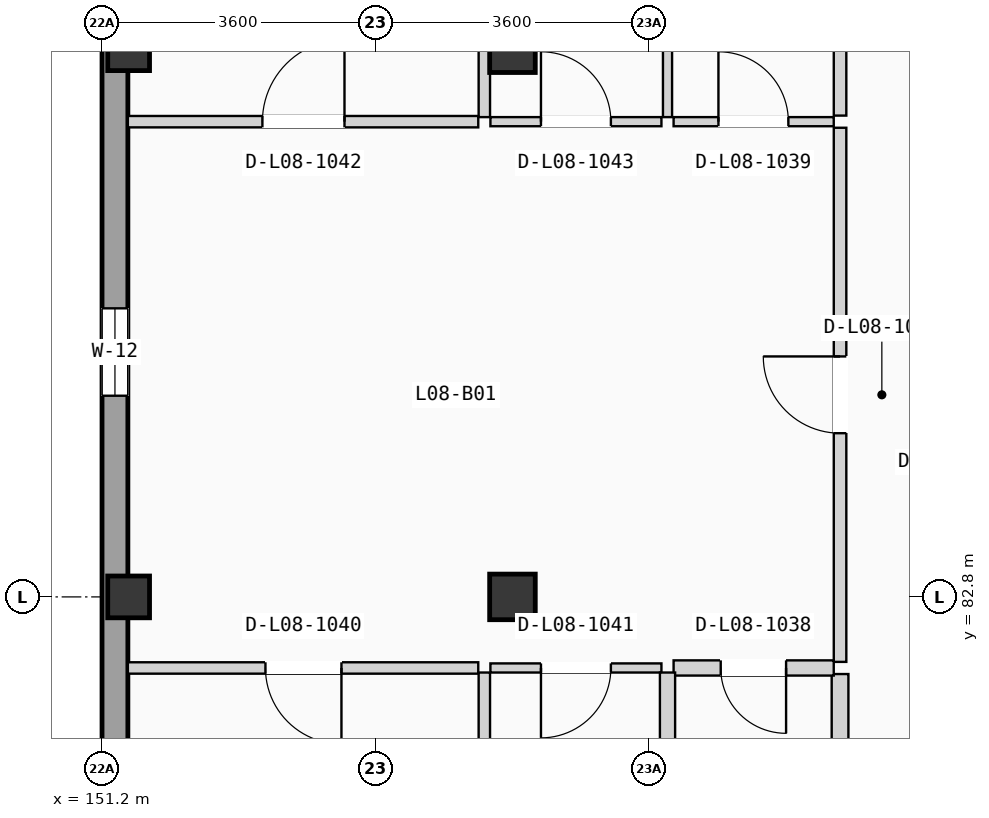
"""IFC4 building model, lengths in metres.
Left out: names, types, materials, properties, quantities, classifications, styles, units other than length and angle.
Written with IfcOpenShell. Run it as: python <this file> out.ifc"""

import sys

from ifc_helpers import new_model, si_unit, direction, frame, frame_2d, origin, origin_2d, place, context, subcontext, project, spatial, rectangle, extrude, element, fill, save


model = new_model("IFC4")
c1 = context("Model", 3, precision=1e-05, world=origin(), true_north=direction((0.0, 1.0)))
c2 = subcontext(c1, "Body", "Model", "MODEL_VIEW")
j1 = project(units=[si_unit("LENGTHUNIT", "METRE"), si_unit("PLANEANGLEUNIT", "RADIAN")], contexts=[c1])
p1 = place(None, origin())
s1 = spatial("IfcSite", under=j1, at=p1, CompositionType="ELEMENT")
p2 = place(p1, origin())
s2 = spatial("IfcBuilding", under=s1, at=p2, CompositionType="ELEMENT")
p3 = place(p2, frame((0.0, 0.0, 27.825)))
s3 = spatial("IfcBuildingStorey", under=s2, at=p3, CompositionType="ELEMENT", Elevation=27.825)
for number, where, z_axis, x_axis in (
    (1, (151.55, 82.8, 0.0), (0.0, 0.0, 1.0), (1.0, 0.0, 0.0)),
    (2, (151.55, 90.0, 0.0), (0.0, 0.0, 1.0), (1.0, 0.0, 0.0)),
):
    element("IfcColumn", number, at=place(p3, frame(where, z_axis=z_axis, x_axis=x_axis)), inside=s3, PredefinedType="COLUMN", context=c2, shape_type="SweptSolid", body=[
        extrude(rectangle(XDim=0.55, YDim=0.55, at=origin_2d()), origin(), (0.0, 0.0, 1.0), 3.15),
    ])
for number, where, z_axis, x_axis in (
    (3, (156.6, 82.8, 0.0), (0.0, 0.0, 1.0), (1.0, 0.0, 0.0)),
    (4, (156.6, 90.0, 0.0), (0.0, 0.0, 1.0), (1.0, 0.0, 0.0)),
):
    element("IfcColumn", number, at=place(p3, frame(where, z_axis=z_axis, x_axis=x_axis)), inside=s3, PredefinedType="COLUMN", context=c2, shape_type="SweptSolid", body=[
        extrude(rectangle(XDim=0.6, YDim=0.6, at=origin_2d()), origin(), (0.0, 0.0, 1.0), 3.15),
    ])
p4 = place(p3, frame((151.37, 68.74, 0.0), z_axis=(0.0, 0.0, 1.0), x_axis=(0.0, 1.0, 0.0)))
e5 = element("IfcWall", 5, at=p4, inside=s3, PredefinedType="SOLIDWALL", context=c2, shape_type="SweptSolid", body=[
    extrude(rectangle(XDim=49.72, YDim=0.34, at=frame_2d((24.86, 0.0))), origin(), (0.0, 0.0, 1.0), 2.89),
])
p5 = place(p4, frame((16.707, 0.0, 0.855)))
e6 = element("IfcOpeningElement", 6, at=p5, cuts=e5, PredefinedType="OPENING", context=c2, shape_type="SweptSolid", body=[
    extrude(rectangle(XDim=1.15, YDim=1.35, at=frame_2d((0.575, 0.675))), frame((0.0, 0.18, 0.0), z_axis=(0.0, -1.0, 0.0), x_axis=(1.0, 0.0, 0.0)), (0.0, 0.0, 1.0), 0.36),
])
p6 = place(p4, frame((9.578, 0.0, 0.705)))
e7 = element("IfcOpeningElement", 7, at=p6, cuts=e5, PredefinedType="OPENING", context=c2, shape_type="SweptSolid", body=[
    extrude(rectangle(XDim=1.15, YDim=1.5, at=frame_2d((0.575, 0.75))), frame((0.0, 0.18, 0.0), z_axis=(0.0, -1.0, 0.0), x_axis=(1.0, 0.0, 0.0)), (0.0, 0.0, 1.0), 0.36),
])
p7 = place(p4, frame((23.279, 0.0, 0.555)))
e8 = element("IfcOpeningElement", 8, at=p7, cuts=e5, PredefinedType="OPENING", context=c2, shape_type="SweptSolid", body=[
    extrude(rectangle(XDim=1.15, YDim=1.65, at=frame_2d((0.575, 0.825))), frame((0.0, 0.18, 0.0), z_axis=(0.0, -1.0, 0.0), x_axis=(1.0, 0.0, 0.0)), (0.0, 0.0, 1.0), 0.36),
])
p8 = place(p4, frame((32.935, 0.0, 0.85)))
e9 = element("IfcOpeningElement", 9, at=p8, cuts=e5, PredefinedType="OPENING", context=c2, shape_type="SweptSolid", body=[
    extrude(rectangle(XDim=0.95, YDim=1.2, at=frame_2d((0.475, 0.6))), frame((0.0, 0.18, 0.0), z_axis=(0.0, -1.0, 0.0), x_axis=(1.0, 0.0, 0.0)), (0.0, 0.0, 1.0), 0.36),
])
p9 = place(p4, frame((29.375, 0.0, 0.9)))
e10 = element("IfcOpeningElement", 10, at=p9, cuts=e5, PredefinedType="OPENING", context=c2, shape_type="SweptSolid", body=[
    extrude(rectangle(XDim=1.25, YDim=1.2, at=frame_2d((0.625, 0.6))), frame((0.0, 0.18, 0.0), z_axis=(0.0, -1.0, 0.0), x_axis=(1.0, 0.0, 0.0)), (0.0, 0.0, 1.0), 0.36),
])
p10 = place(p4, frame((39.379, 0.0, 0.855)))
e11 = element("IfcOpeningElement", 11, at=p10, cuts=e5, PredefinedType="OPENING", context=c2, shape_type="SweptSolid", body=[
    extrude(rectangle(XDim=1.25, YDim=1.35, at=frame_2d((0.625, 0.675))), frame((0.0, 0.18, 0.0), z_axis=(0.0, -1.0, 0.0), x_axis=(1.0, 0.0, 0.0)), (0.0, 0.0, 1.0), 0.36),
])
p11 = place(p3, frame((160.91, 81.945, 0.0), z_axis=(0.0, 0.0, 1.0), x_axis=(0.0, 1.0, 0.0)))
e12 = element("IfcWall", 12, at=p11, inside=s3, PredefinedType="PARTITIONING", context=c2, shape_type="SweptSolid", body=[
    extrude(rectangle(XDim=7.028, YDim=0.165, at=frame_2d((3.514, 0.0))), origin(), (0.0, 0.0, 1.0), 2.87),
])
p12 = place(p11, frame((3.009, 0.0, 0.0)))
e13 = element("IfcOpeningElement", 13, at=p12, cuts=e12, PredefinedType="OPENING", context=c2, shape_type="SweptSolid", body=[
    extrude(rectangle(XDim=1.01, YDim=2.11, at=frame_2d((0.505, 1.055))), frame((0.0, 0.093, 0.0), z_axis=(0.0, -1.0, 0.0), x_axis=(1.0, 0.0, 0.0)), (0.0, 0.0, 1.0), 0.185),
])
p13 = place(p3, frame((160.91, 76.0, 0.0), z_axis=(0.0, 0.0, 1.0), x_axis=(0.0, 1.0, 0.0)))
e14 = element("IfcWall", 14, at=p13, inside=s3, PredefinedType="PLUMBINGWALL", context=c2, shape_type="SweptSolid", body=[
    extrude(rectangle(XDim=5.785, YDim=0.22, at=frame_2d((2.893, 0.0))), origin(), (0.0, 0.0, 1.0), 2.87),
])
p14 = place(p3, frame((160.91, 89.133, 0.0), z_axis=(0.0, 0.0, 1.0), x_axis=(0.0, 1.0, 0.0)))
e15 = element("IfcWall", 15, at=p14, inside=s3, PredefinedType="PARTITIONING", context=c2, shape_type="SweptSolid", body=[
    extrude(rectangle(XDim=5.785, YDim=0.165, at=frame_2d((2.893, 0.0))), origin(), (0.0, 0.0, 1.0), 2.87),
])
p15 = place(p3, frame((158.72, 81.865, 0.0), z_axis=(0.0, 0.0, 1.0), x_axis=(1.0, 0.0, 0.0)))
e16 = element("IfcWall", 16, at=p15, inside=s3, PredefinedType="PLUMBINGWALL", context=c2, shape_type="SweptSolid", body=[
    extrude(rectangle(XDim=2.107, YDim=0.2, at=frame_2d((1.053, 0.0))), origin(), (0.0, 0.0, 1.0), 2.87),
])
p16 = place(p15, frame((0.62, 0.0, 0.0)))
e17 = element("IfcOpeningElement", 17, at=p16, cuts=e16, PredefinedType="OPENING", context=c2, shape_type="SweptSolid", body=[
    extrude(rectangle(XDim=0.86, YDim=2.0, at=frame_2d((0.43, 1.0))), frame((0.0, 0.11, 0.0), z_axis=(0.0, -1.0, 0.0), x_axis=(1.0, 0.0, 0.0)), (0.0, 0.0, 1.0), 0.22),
])
p17 = place(p3, frame((158.72, 89.053, 0.0), z_axis=(0.0, 0.0, 1.0), x_axis=(1.0, 0.0, 0.0)))
e18 = element("IfcWall", 18, at=p17, inside=s3, PredefinedType="PARTITIONING", context=c2, shape_type="SweptSolid", body=[
    extrude(rectangle(XDim=2.107, YDim=0.12, at=frame_2d((1.053, 0.0))), origin(), (0.0, 0.0, 1.0), 2.87),
])
p18 = place(p17, frame((0.59, 0.0, 0.0)))
e19 = element("IfcOpeningElement", 19, at=p18, cuts=e18, PredefinedType="OPENING", context=c2, shape_type="SweptSolid", body=[
    extrude(rectangle(XDim=0.92, YDim=2.02, at=frame_2d((0.46, 1.01))), frame((0.0, 0.07, 0.0), z_axis=(0.0, -1.0, 0.0), x_axis=(1.0, 0.0, 0.0)), (0.0, 0.0, 1.0), 0.14),
])
p19 = place(p3, frame((151.54, 81.865, 0.0), z_axis=(0.0, 0.0, 1.0), x_axis=(1.0, 0.0, 0.0)))
e20 = element("IfcWall", 20, at=p19, inside=s3, PredefinedType="PARTITIONING", context=c2, shape_type="SweptSolid", body=[
    extrude(rectangle(XDim=4.61, YDim=0.15, at=frame_2d((2.305, 0.0))), origin(), (0.0, 0.0, 1.0), 2.87),
])
p20 = place(p19, frame((1.81, 0.0, 0.0)))
e21 = element("IfcOpeningElement", 21, at=p20, cuts=e20, PredefinedType="OPENING", context=c2, shape_type="SweptSolid", body=[
    extrude(rectangle(XDim=1.0, YDim=2.06, at=frame_2d((0.5, 1.03))), frame((0.0, 0.085, 0.0), z_axis=(0.0, -1.0, 0.0), x_axis=(1.0, 0.0, 0.0)), (0.0, 0.0, 1.0), 0.17),
])
p21 = place(p3, frame((156.31, 81.865, 0.0), z_axis=(0.0, 0.0, 1.0), x_axis=(1.0, 0.0, 0.0)))
e22 = element("IfcWall", 22, at=p21, inside=s3, PredefinedType="PARTITIONING", context=c2, shape_type="SweptSolid", body=[
    extrude(rectangle(XDim=2.25, YDim=0.12, at=frame_2d((1.125, 0.0))), origin(), (0.0, 0.0, 1.0), 2.87),
])
p22 = place(p21, frame((0.665, 0.0, 0.0)))
e23 = element("IfcOpeningElement", 23, at=p22, cuts=e22, PredefinedType="OPENING", context=c2, shape_type="SweptSolid", body=[
    extrude(rectangle(XDim=0.92, YDim=2.02, at=frame_2d((0.46, 1.01))), frame((0.0, 0.07, 0.0), z_axis=(0.0, -1.0, 0.0), x_axis=(1.0, 0.0, 0.0)), (0.0, 0.0, 1.0), 0.14),
])
p23 = place(p3, frame((151.54, 89.053, 0.0), z_axis=(0.0, 0.0, 1.0), x_axis=(1.0, 0.0, 0.0)))
e24 = element("IfcWall", 24, at=p23, inside=s3, PredefinedType="PARTITIONING", context=c2, shape_type="SweptSolid", body=[
    extrude(rectangle(XDim=4.61, YDim=0.15, at=frame_2d((2.305, 0.0))), origin(), (0.0, 0.0, 1.0), 2.87),
])
p24 = place(p23, frame((1.77, 0.0, 0.0)))
e25 = element("IfcOpeningElement", 25, at=p24, cuts=e24, PredefinedType="OPENING", context=c2, shape_type="SweptSolid", body=[
    extrude(rectangle(XDim=1.08, YDim=2.1, at=frame_2d((0.54, 1.05))), frame((0.0, 0.085, 0.0), z_axis=(0.0, -1.0, 0.0), x_axis=(1.0, 0.0, 0.0)), (0.0, 0.0, 1.0), 0.17),
])
p25 = place(p3, frame((156.31, 89.053, 0.0), z_axis=(0.0, 0.0, 1.0), x_axis=(1.0, 0.0, 0.0)))
e26 = element("IfcWall", 26, at=p25, inside=s3, PredefinedType="PARTITIONING", context=c2, shape_type="SweptSolid", body=[
    extrude(rectangle(XDim=2.25, YDim=0.12, at=frame_2d((1.125, 0.0))), origin(), (0.0, 0.0, 1.0), 2.87),
])
p26 = place(p25, frame((0.665, 0.0, 0.0)))
e27 = element("IfcOpeningElement", 27, at=p26, cuts=e26, PredefinedType="OPENING", context=c2, shape_type="SweptSolid", body=[
    extrude(rectangle(XDim=0.92, YDim=2.02, at=frame_2d((0.46, 1.01))), frame((0.0, 0.07, 0.0), z_axis=(0.0, -1.0, 0.0), x_axis=(1.0, 0.0, 0.0)), (0.0, 0.0, 1.0), 0.14),
])
p27 = place(p3, frame((158.64, 76.0, 0.0), z_axis=(0.0, 0.0, 1.0), x_axis=(0.0, 1.0, 0.0)))
e28 = element("IfcWall", 28, at=p27, inside=s3, PredefinedType="PLUMBINGWALL", context=c2, shape_type="SweptSolid", body=[
    extrude(rectangle(XDim=5.805, YDim=0.2, at=frame_2d((2.902, 0.0))), origin(), (0.0, 0.0, 1.0), 2.87),
])
p28 = place(p27, frame((2.467, 0.0, 0.0)))
e29 = element("IfcOpeningElement", 29, at=p28, cuts=e28, PredefinedType="OPENING", context=c2, shape_type="SweptSolid", body=[
    extrude(rectangle(XDim=0.85, YDim=2.01, at=frame_2d((0.425, 1.005))), frame((0.0, 0.11, 0.0), z_axis=(0.0, -1.0, 0.0), x_axis=(1.0, 0.0, 0.0)), (0.0, 0.0, 1.0), 0.22),
])
p29 = place(p3, frame((158.64, 89.113, 0.0), z_axis=(0.0, 0.0, 1.0), x_axis=(0.0, 1.0, 0.0)))
e30 = element("IfcWall", 30, at=p29, inside=s3, PredefinedType="PARTITIONING", context=c2, shape_type="SweptSolid", body=[
    extrude(rectangle(XDim=5.805, YDim=0.12, at=frame_2d((2.902, 0.0))), origin(), (0.0, 0.0, 1.0), 2.87),
])
for number, where, z_axis, x_axis in (
    (31, (156.23, 76.0, 0.0), (0.0, 0.0, 1.0), (0.0, 1.0, 0.0)),
    (32, (156.23, 89.113, 0.0), (0.0, 0.0, 1.0), (0.0, 1.0, 0.0)),
):
    element("IfcWall", number, at=place(p3, frame(where, z_axis=z_axis, x_axis=x_axis)), inside=s3, PredefinedType="PARTITIONING", context=c2, shape_type="SweptSolid", body=[
        extrude(rectangle(XDim=5.805, YDim=0.15, at=frame_2d((2.902, 0.0))), origin(), (0.0, 0.0, 1.0), 2.87),
    ])
p30 = place(p5, origin())
e33 = element("IfcWindow", 33, at=p30, inside=s3, PartitioningType="SINGLE_PANEL", PredefinedType="WINDOW", context=c2, shape_type="SweptSolid", body=[
    extrude(rectangle(XDim=1.15, YDim=1.35, at=frame_2d((0.575, 0.675))), frame((0.0, 0.03, 0.0), z_axis=(0.0, -1.0, 0.0), x_axis=(1.0, 0.0, 0.0)), (0.0, 0.0, 1.0), 0.06),
])
fill(e6, e33)
p31 = place(p12, origin())
e34 = element("IfcDoor", 34, at=p31, inside=s3, OperationType="SINGLE_SWING_RIGHT", PredefinedType="DOOR", context=c2, shape_type="SweptSolid", body=[
    extrude(rectangle(XDim=1.01, YDim=2.11, at=frame_2d((0.505, 1.055))), frame((0.0, 0.025, 0.0), z_axis=(0.0, -1.0, 0.0), x_axis=(1.0, 0.0, 0.0)), (0.0, 0.0, 1.0), 0.05),
])
fill(e13, e34)
p32 = place(p16, frame((0.86, 0.0, 0.0), z_axis=(0.0, 0.0, 1.0), x_axis=(-1.0, 0.0, 0.0)))
e35 = element("IfcDoor", 35, at=p32, inside=s3, OperationType="SINGLE_SWING_RIGHT", PredefinedType="DOOR", context=c2, shape_type="SweptSolid", body=[
    extrude(rectangle(XDim=0.86, YDim=2.0, at=frame_2d((0.43, 1.0))), frame((0.0, 0.025, 0.0), z_axis=(0.0, -1.0, 0.0), x_axis=(1.0, 0.0, 0.0)), (0.0, 0.0, 1.0), 0.05),
])
fill(e17, e35)
p33 = place(p18, origin())
e36 = element("IfcDoor", 36, at=p33, inside=s3, OperationType="SINGLE_SWING_LEFT", PredefinedType="DOOR", context=c2, shape_type="SweptSolid", body=[
    extrude(rectangle(XDim=0.92, YDim=2.02, at=frame_2d((0.46, 1.01))), frame((0.0, 0.025, 0.0), z_axis=(0.0, -1.0, 0.0), x_axis=(1.0, 0.0, 0.0)), (0.0, 0.0, 1.0), 0.05),
])
fill(e19, e36)
p34 = place(p20, frame((1.0, 0.0, 0.0), z_axis=(0.0, 0.0, 1.0), x_axis=(-1.0, 0.0, 0.0)))
e37 = element("IfcDoor", 37, at=p34, inside=s3, OperationType="SINGLE_SWING_RIGHT", PredefinedType="DOOR", context=c2, shape_type="SweptSolid", body=[
    extrude(rectangle(XDim=1.0, YDim=2.06, at=frame_2d((0.5, 1.03))), frame((0.0, 0.025, 0.0), z_axis=(0.0, -1.0, 0.0), x_axis=(1.0, 0.0, 0.0)), (0.0, 0.0, 1.0), 0.05),
])
fill(e21, e37)
p35 = place(p22, frame((0.92, 0.0, 0.0), z_axis=(0.0, 0.0, 1.0), x_axis=(-1.0, 0.0, 0.0)))
e38 = element("IfcDoor", 38, at=p35, inside=s3, OperationType="SINGLE_SWING_LEFT", PredefinedType="DOOR", context=c2, shape_type="SweptSolid", body=[
    extrude(rectangle(XDim=0.92, YDim=2.02, at=frame_2d((0.46, 1.01))), frame((0.0, 0.025, 0.0), z_axis=(0.0, -1.0, 0.0), x_axis=(1.0, 0.0, 0.0)), (0.0, 0.0, 1.0), 0.05),
])
fill(e23, e38)
p36 = place(p24, origin())
e39 = element("IfcDoor", 39, at=p36, inside=s3, OperationType="SINGLE_SWING_RIGHT", PredefinedType="DOOR", context=c2, shape_type="SweptSolid", body=[
    extrude(rectangle(XDim=1.08, YDim=2.1, at=frame_2d((0.54, 1.05))), frame((0.0, 0.025, 0.0), z_axis=(0.0, -1.0, 0.0), x_axis=(1.0, 0.0, 0.0)), (0.0, 0.0, 1.0), 0.05),
])
fill(e25, e39)
p37 = place(p26, origin())
e40 = element("IfcDoor", 40, at=p37, inside=s3, OperationType="SINGLE_SWING_LEFT", PredefinedType="DOOR", context=c2, shape_type="SweptSolid", body=[
    extrude(rectangle(XDim=0.92, YDim=2.02, at=frame_2d((0.46, 1.01))), frame((0.0, 0.025, 0.0), z_axis=(0.0, -1.0, 0.0), x_axis=(1.0, 0.0, 0.0)), (0.0, 0.0, 1.0), 0.05),
])
fill(e27, e40)
save(model, sys.argv[1])
